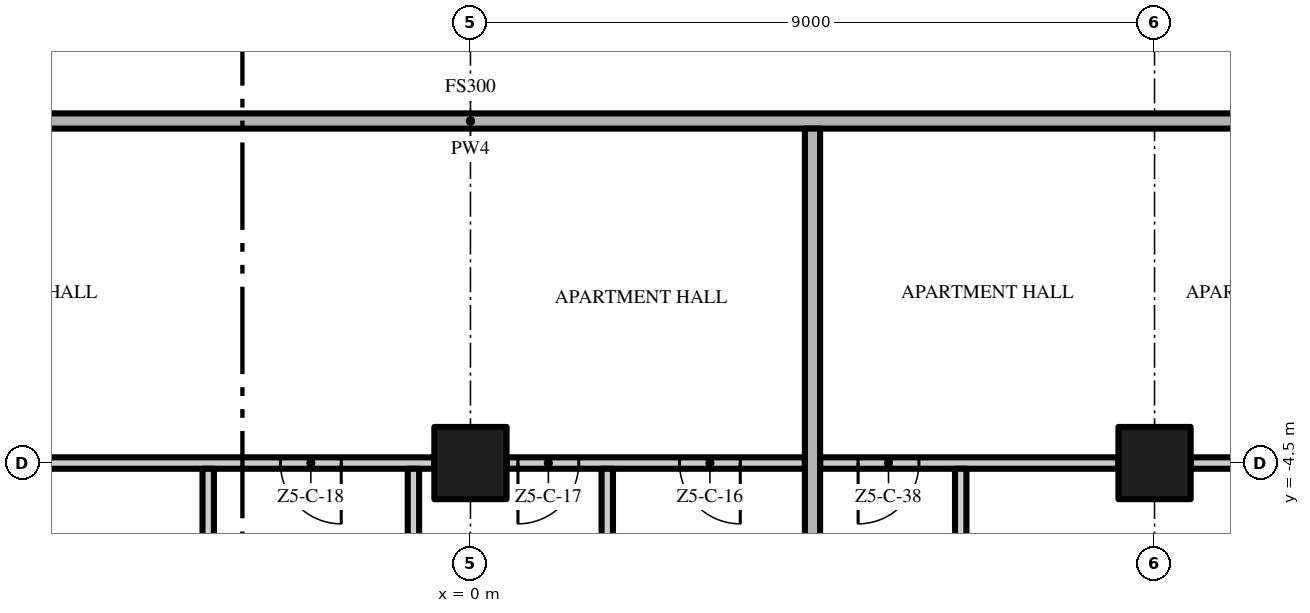
"""IFC4 building model, lengths in metres.
Left out: names, types, materials, properties, quantities, classifications, styles, units other than length and angle.
Written with IfcOpenShell. Run it as: python <this file> out.ifc"""

import sys

from ifc_helpers import new_model, si_unit, direction, frame, frame_2d, origin, origin_2d, place, context, subcontext, project, spatial, rectangle, extrude, element, fill, save


model = new_model("IFC4")
c1 = context("Model", 3, precision=1e-05, world=origin(), true_north=direction((0.0, 1.0)))
c2 = subcontext(c1, "Body", "Model", "MODEL_VIEW")
j1 = project(units=[si_unit("LENGTHUNIT", "METRE"), si_unit("PLANEANGLEUNIT", "RADIAN")], contexts=[c1])
p1 = place(None, origin())
s1 = spatial("IfcSite", under=j1, at=p1, CompositionType="ELEMENT")
p2 = place(p1, origin())
s2 = spatial("IfcBuilding", under=s1, at=p2, CompositionType="ELEMENT")
p3 = place(p2, frame((0.0, 0.0, 261.6)))
s3 = spatial("IfcBuildingStorey", under=s2, at=p3, CompositionType="ELEMENT", Elevation=261.6)
for number, where, z_axis, x_axis in (
    (1, (0.0, -4.5, 0.0), (0.0, 0.0, 1.0), (1.0, 0.0, 0.0)),
    (2, (9.0, -4.5, 0.0), (0.0, 0.0, 1.0), (1.0, 0.0, 0.0)),
):
    element("IfcColumn", number, at=place(p3, frame(where, z_axis=z_axis, x_axis=x_axis)), inside=s3, PredefinedType="COLUMN", context=c2, shape_type="SweptSolid", body=[
        extrude(rectangle(XDim=0.95, YDim=0.95, at=origin_2d()), origin(), (0.0, 0.0, 1.0), 3.5),
    ])
p4 = place(p3, frame((-0.475, -4.5, 0.0), z_axis=(0.0, 0.0, 1.0), x_axis=(-1.0, 0.0, 0.0)))
e3 = element("IfcWall", 3, at=p4, inside=s3, PredefinedType="PARTITIONING", context=c2, shape_type="SweptSolid", body=[
    extrude(rectangle(XDim=8.05, YDim=0.15, at=frame_2d((4.025, 0.0))), origin(), (0.0, 0.0, 1.0), 3.5),
])
p5 = place(p4, frame((1.225, 0.0, 0.0)))
e4 = element("IfcOpeningElement", 4, at=p5, cuts=e3, PredefinedType="OPENING", context=c2, shape_type="SweptSolid", body=[
    extrude(rectangle(XDim=0.8, YDim=2.0, at=frame_2d((0.4, 1.0))), frame((0.0, 0.085, 0.0), z_axis=(0.0, -1.0, 0.0), x_axis=(1.0, 0.0, 0.0)), (0.0, 0.0, 1.0), 0.17),
])
p6 = place(p3, frame((4.4, -4.5, 0.0), z_axis=(0.0, 0.0, 1.0), x_axis=(-1.0, 0.0, 0.0)))
e5 = element("IfcWall", 5, at=p6, inside=s3, PredefinedType="PARTITIONING", context=c2, shape_type="SweptSolid", body=[
    extrude(rectangle(XDim=3.925, YDim=0.15, at=frame_2d((1.962, 0.0))), origin(), (0.0, 0.0, 1.0), 3.5),
])
p7 = place(p6, frame((0.85, 0.0, 0.0)))
e6 = element("IfcOpeningElement", 6, at=p7, cuts=e5, PredefinedType="OPENING", context=c2, shape_type="SweptSolid", body=[
    extrude(rectangle(XDim=0.8, YDim=2.0, at=frame_2d((0.4, 1.0))), frame((0.0, 0.085, 0.0), z_axis=(0.0, -1.0, 0.0), x_axis=(1.0, 0.0, 0.0)), (0.0, 0.0, 1.0), 0.17),
])
p8 = place(p6, frame((2.975, 0.0, 0.0)))
e7 = element("IfcOpeningElement", 7, at=p8, cuts=e5, PredefinedType="OPENING", context=c2, shape_type="SweptSolid", body=[
    extrude(rectangle(XDim=0.8, YDim=2.0, at=frame_2d((0.4, 1.0))), frame((0.0, 0.085, 0.0), z_axis=(0.0, -1.0, 0.0), x_axis=(1.0, 0.0, 0.0)), (0.0, 0.0, 1.0), 0.17),
])
p9 = place(p3, frame((8.525, -4.5, 0.0), z_axis=(0.0, 0.0, 1.0), x_axis=(-1.0, 0.0, 0.0)))
e8 = element("IfcWall", 8, at=p9, inside=s3, PredefinedType="PARTITIONING", context=c2, shape_type="SweptSolid", body=[
    extrude(rectangle(XDim=3.925, YDim=0.15, at=frame_2d((1.962, 0.0))), origin(), (0.0, 0.0, 1.0), 3.5),
])
p10 = place(p9, frame((2.625, 0.0, 0.0)))
e9 = element("IfcOpeningElement", 9, at=p10, cuts=e8, PredefinedType="OPENING", context=c2, shape_type="SweptSolid", body=[
    extrude(rectangle(XDim=0.8, YDim=2.0, at=frame_2d((0.4, 1.0))), frame((0.0, 0.085, 0.0), z_axis=(0.0, -1.0, 0.0), x_axis=(1.0, 0.0, 0.0)), (0.0, 0.0, 1.0), 0.17),
])
p11 = place(p3, frame((9.475, -4.5, 0.0), z_axis=(0.0, 0.0, 1.0), x_axis=(1.0, 0.0, 0.0)))
e10 = element("IfcWall", 10, at=p11, inside=s3, PredefinedType="PARTITIONING", context=c2, shape_type="SweptSolid", body=[
    extrude(rectangle(XDim=5.15, YDim=0.15, at=frame_2d((2.575, 0.0))), origin(), (0.0, 0.0, 1.0), 3.5),
])
p12 = place(p3, frame((17.4, 0.0, 0.0), z_axis=(0.0, 0.0, 1.0), x_axis=(-1.0, 0.0, 0.0)))
e11 = element("IfcWall", 11, at=p12, inside=s3, PredefinedType="PARTITIONING", context=c2, shape_type="SweptSolid", body=[
    extrude(rectangle(XDim=34.8, YDim=0.2, at=frame_2d((17.4, 0.0))), origin(), (0.0, 0.0, 1.0), 3.5),
])
p13 = place(p12, frame((23.4, 0.0, 0.0)))
e12 = element("IfcOpeningElement", 12, at=p13, cuts=e11, PredefinedType="OPENING", context=c2, shape_type="SweptSolid", body=[
    extrude(rectangle(XDim=1.5, YDim=2.4, at=frame_2d((0.75, 1.2))), frame((0.0, 0.11, 0.0), z_axis=(0.0, -1.0, 0.0), x_axis=(1.0, 0.0, 0.0)), (0.0, 0.0, 1.0), 0.22),
])
p14 = place(p12, frame((5.4, 0.0, 0.0)))
e13 = element("IfcOpeningElement", 13, at=p14, cuts=e11, PredefinedType="OPENING", context=c2, shape_type="SweptSolid", body=[
    extrude(rectangle(XDim=1.5, YDim=2.4, at=frame_2d((0.75, 1.2))), frame((0.0, 0.11, 0.0), z_axis=(0.0, -1.0, 0.0), x_axis=(1.0, 0.0, 0.0)), (0.0, 0.0, 1.0), 0.22),
])
for number, where, z_axis, x_axis in (
    (14, (-3.45, -8.925, 0.0), (0.0, 0.0, 1.0), (0.0, 1.0, 0.0)),
    (15, (-0.75, -8.925, 0.0), (0.0, 0.0, 1.0), (0.0, 1.0, 0.0)),
    (16, (1.8, -8.925, 0.0), (0.0, 0.0, 1.0), (0.0, 1.0, 0.0)),
):
    element("IfcWall", number, at=place(p3, frame(where, z_axis=z_axis, x_axis=x_axis)), inside=s3, PredefinedType="PARTITIONING", context=c2, shape_type="SweptSolid", body=[
        extrude(rectangle(XDim=4.35, YDim=0.15, at=frame_2d((2.175, 0.0))), origin(), (0.0, 0.0, 1.0), 3.5),
    ])
p15 = place(p3, frame((4.5, -22.2, 0.0), z_axis=(0.0, 0.0, 1.0), x_axis=(0.0, 1.0, 0.0)))
e17 = element("IfcWall", 17, at=p15, inside=s3, PredefinedType="PARTITIONING", context=c2, shape_type="SweptSolid", body=[
    extrude(rectangle(XDim=22.1, YDim=0.2, at=frame_2d((11.05, 0.0))), origin(), (0.0, 0.0, 1.0), 3.5),
])
p16 = place(p3, frame((6.45, -8.925, 0.0), z_axis=(0.0, 0.0, 1.0), x_axis=(0.0, 1.0, 0.0)))
e18 = element("IfcWall", 18, at=p16, inside=s3, PredefinedType="PARTITIONING", context=c2, shape_type="SweptSolid", body=[
    extrude(rectangle(XDim=4.35, YDim=0.15, at=frame_2d((2.175, 0.0))), origin(), (0.0, 0.0, 1.0), 3.5),
])
p17 = place(p7, origin())
e19 = element("IfcDoor", 19, at=p17, inside=s3, OperationType="SINGLE_SWING_LEFT", PredefinedType="DOOR", context=c2, shape_type="SweptSolid", body=[
    extrude(rectangle(XDim=0.8, YDim=2.0, at=frame_2d((0.4, 1.0))), frame((0.0, 0.025, 0.0), z_axis=(0.0, -1.0, 0.0), x_axis=(1.0, 0.0, 0.0)), (0.0, 0.0, 1.0), 0.05),
])
fill(e6, e19)
p18 = place(p8, origin())
e20 = element("IfcDoor", 20, at=p18, inside=s3, OperationType="SINGLE_SWING_RIGHT", PredefinedType="DOOR", context=c2, shape_type="SweptSolid", body=[
    extrude(rectangle(XDim=0.8, YDim=2.0, at=frame_2d((0.4, 1.0))), frame((0.0, 0.025, 0.0), z_axis=(0.0, -1.0, 0.0), x_axis=(1.0, 0.0, 0.0)), (0.0, 0.0, 1.0), 0.05),
])
fill(e7, e20)
p19 = place(p5, origin())
e21 = element("IfcDoor", 21, at=p19, inside=s3, OperationType="SINGLE_SWING_LEFT", PredefinedType="DOOR", context=c2, shape_type="SweptSolid", body=[
    extrude(rectangle(XDim=0.8, YDim=2.0, at=frame_2d((0.4, 1.0))), frame((0.0, 0.025, 0.0), z_axis=(0.0, -1.0, 0.0), x_axis=(1.0, 0.0, 0.0)), (0.0, 0.0, 1.0), 0.05),
])
fill(e4, e21)
p20 = place(p10, origin())
e22 = element("IfcDoor", 22, at=p20, inside=s3, OperationType="SINGLE_SWING_RIGHT", PredefinedType="DOOR", context=c2, shape_type="SweptSolid", body=[
    extrude(rectangle(XDim=0.8, YDim=2.0, at=frame_2d((0.4, 1.0))), frame((0.0, 0.025, 0.0), z_axis=(0.0, -1.0, 0.0), x_axis=(1.0, 0.0, 0.0)), (0.0, 0.0, 1.0), 0.05),
])
fill(e9, e22)
save(model, sys.argv[1])
